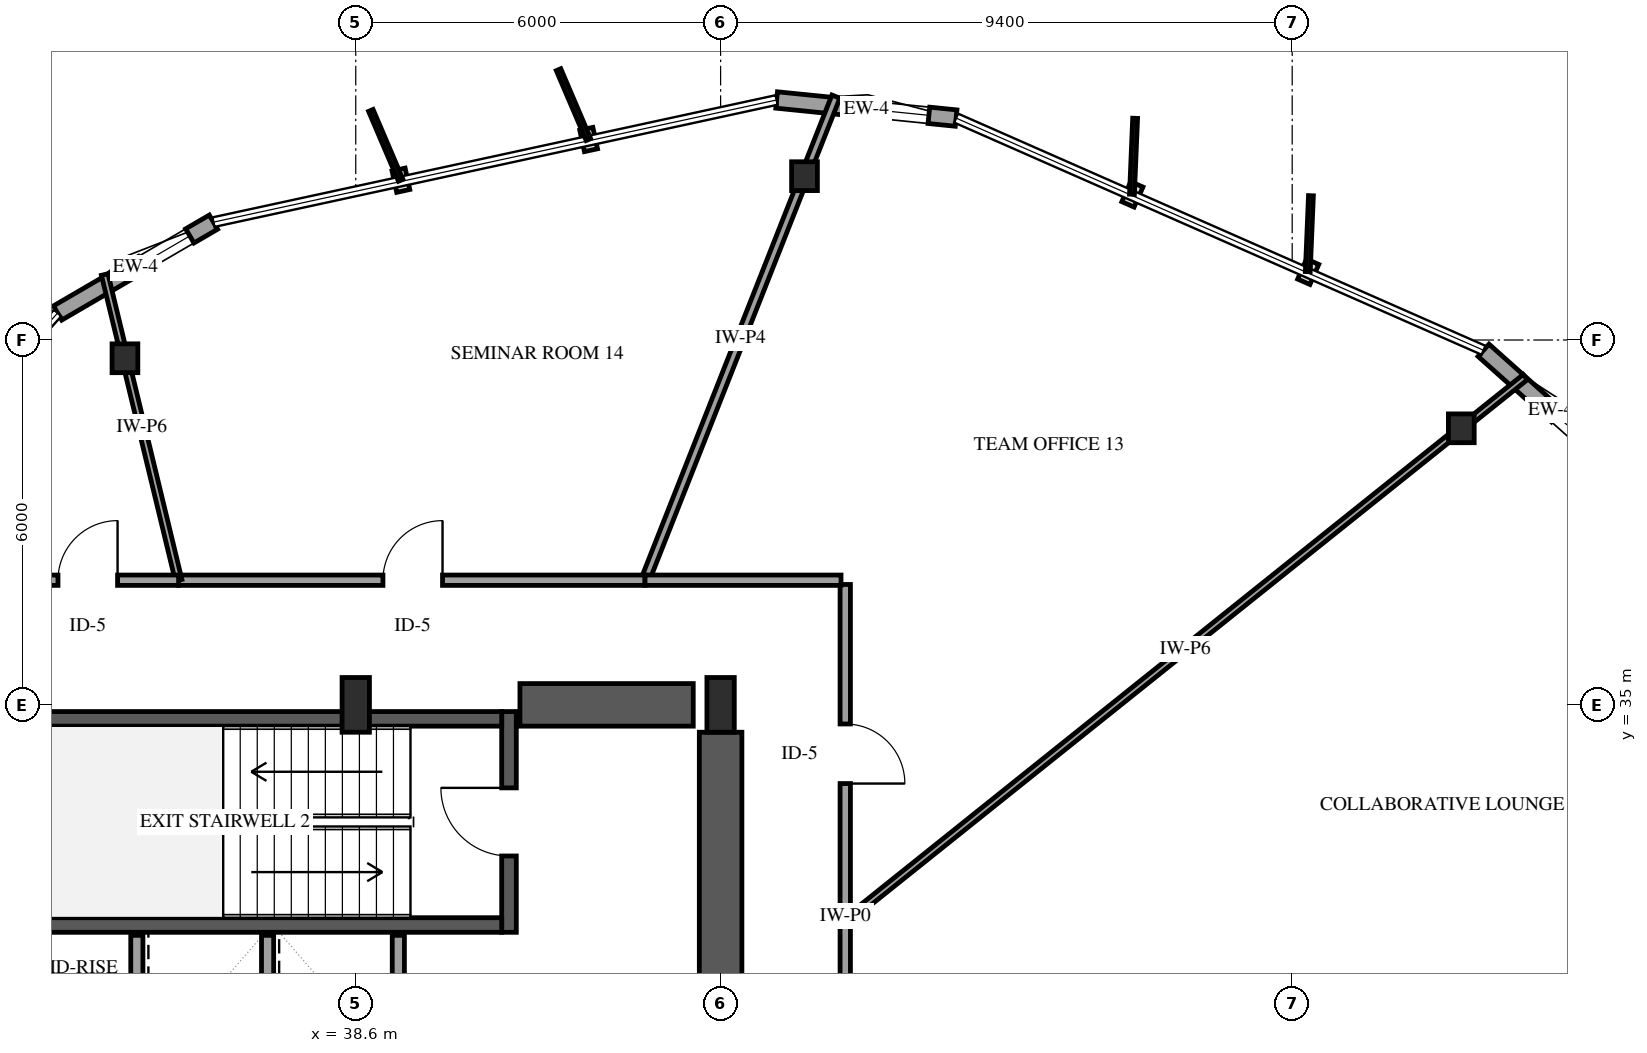
"""IFC4 building model, lengths in metres.
Left out: names, types, materials, properties, quantities, classifications, styles, units other than length and angle.
Written with IfcOpenShell. Run it as: python <this file> out.ifc"""

import sys

from ifc_helpers import new_model, si_unit, direction, frame, frame_2d, origin, origin_2d, place, context, subcontext, project, spatial, rectangle, i_section, extrude, element, fill, save


model = new_model("IFC4")
c1 = context("Model", 3, precision=1e-05, world=origin(), true_north=direction((0.0, 1.0)))
c2 = subcontext(c1, "Body", "Model", "MODEL_VIEW")
j1 = project(units=[si_unit("LENGTHUNIT", "METRE"), si_unit("PLANEANGLEUNIT", "RADIAN")], contexts=[c1])
p1 = place(None, origin())
s1 = spatial("IfcSite", under=j1, at=p1, CompositionType="ELEMENT")
p2 = place(p1, origin())
s2 = spatial("IfcBuilding", under=s1, at=p2, CompositionType="ELEMENT")
p3 = place(p2, frame((0.0, 0.0, 74.6)))
s3 = spatial("IfcBuildingStorey", under=s2, at=p3, CompositionType="ELEMENT", Elevation=74.6)
p4 = place(p3, frame((41.12, 31.26, 0.0), z_axis=(0.0, 0.0, 1.0), x_axis=(0.0, 1.0, 0.0)))
e1 = element("IfcWall", 1, at=p4, inside=s3, PredefinedType="SHEAR", context=c2, shape_type="SweptSolid", body=[
    extrude(rectangle(XDim=3.63, YDim=0.24, at=frame_2d((1.815, 0.0))), origin(), (0.0, 0.0, 1.0), 4.0),
])
p5 = place(p4, frame((1.255, 0.0, 0.0)))
e2 = element("IfcOpeningElement", 2, at=p5, cuts=e1, PredefinedType="OPENING", context=c2, shape_type="SweptSolid", body=[
    extrude(rectangle(XDim=1.12, YDim=2.15, at=frame_2d((0.56, 1.075))), frame((0.0, 0.13, 0.0), z_axis=(0.0, -1.0, 0.0), x_axis=(1.0, 0.0, 0.0)), (0.0, 0.0, 1.0), 0.26),
])
for number, where, z_axis, x_axis in (
    (3, (33.0, 31.38, 0.0), (0.0, 0.0, 1.0), (1.0, 0.0, 0.0)),
    (4, (33.0, 34.77, 0.0), (0.0, 0.0, 1.0), (1.0, 0.0, 0.0)),
):
    element("IfcWall", number, at=place(p3, frame(where, z_axis=z_axis, x_axis=x_axis)), inside=s3, PredefinedType="SHEAR", context=c2, shape_type="SweptSolid", body=[
        extrude(rectangle(XDim=8.0, YDim=0.24, at=frame_2d((4.0, 0.0))), origin(), (0.0, 0.0, 1.0), 4.0),
    ])
p6 = place(p3, frame((41.3, 35.0, 0.0), z_axis=(0.0, 0.0, 1.0), x_axis=(1.0, 0.0, 0.0)))
e5 = element("IfcWall", 5, at=p6, inside=s3, PredefinedType="SHEAR", context=c2, shape_type="SweptSolid", body=[
    extrude(rectangle(XDim=2.85, YDim=0.7, at=frame_2d((1.425, 0.0))), origin(), (0.0, 0.0, 1.0), 4.0),
])
p7 = place(p3, frame((44.6, 29.8, 0.0), z_axis=(0.0, 0.0, 1.0), x_axis=(0.0, 1.0, 0.0)))
e6 = element("IfcWall", 6, at=p7, inside=s3, PredefinedType="SHEAR", context=c2, shape_type="SweptSolid", body=[
    extrude(rectangle(XDim=4.75, YDim=0.7, at=frame_2d((2.375, 0.0))), origin(), (0.0, 0.0, 1.0), 4.0),
])
for number, where, z_axis, x_axis in (
    (7, (38.6, 35.0, 0.0), (0.0, 0.0, 1.0), (1.0, 0.0, 0.0)),
    (8, (44.6, 35.0, 0.0), (0.0, 0.0, 1.0), (1.0, 0.0, 0.0)),
):
    element("IfcColumn", number, at=place(p3, frame(where, z_axis=z_axis, x_axis=x_axis)), inside=s3, PredefinedType="PILASTER", context=c2, shape_type="SweptSolid", body=[
        extrude(rectangle(XDim=0.45, YDim=0.9, at=origin_2d()), origin(), (0.0, 0.0, 1.0), 4.0),
    ])
for number, where, z_axis, x_axis in (
    (9, (56.781, 39.548, 0.0), (0.0, 0.0, 1.0), (1.0, 0.0, 0.0)),
    (10, (45.98, 43.694, 0.0), (0.0, 0.0, 1.0), (1.0, 0.0, 0.0)),
    (11, (34.804, 40.7, 0.0), (0.0, 0.0, 1.0), (1.0, 0.0, 0.0)),
):
    element("IfcColumn", number, at=place(p3, frame(where, z_axis=z_axis, x_axis=x_axis)), inside=s3, PredefinedType="COLUMN", context=c2, shape_type="SweptSolid", body=[
        extrude(i_section(OverallWidth=0.424, OverallDepth=0.474, WebThickness=0.048, FlangeThickness=0.077, FilletRadius=0.038, at=origin_2d()), origin(), (0.0, 0.0, 1.0), 4.0),
    ])
p8 = place(p3, frame((59.36, 38.856, 0.0), z_axis=(0.0, 0.0, 1.0), x_axis=(-0.745968322864, 0.665981427131, 0.0)))
e12 = element("IfcWall", 12, at=p8, inside=s3, PredefinedType="SOLIDWALL", context=c2, shape_type="SweptSolid", body=[
    extrude(rectangle(XDim=2.967, YDim=0.27, at=frame_2d((1.483, 0.0))), origin(), (0.0, 0.0, 1.0), 3.079),
])
p9 = place(p8, frame((0.45, 0.0, 0.75)))
e13 = element("IfcOpeningElement", 13, at=p9, cuts=e12, PredefinedType="OPENING", context=c2, shape_type="SweptSolid", body=[
    extrude(rectangle(XDim=0.9, YDim=1.5, at=frame_2d((0.45, 0.75))), frame((0.0, 0.145, 0.0), z_axis=(0.0, -1.0, 0.0), x_axis=(1.0, 0.0, 0.0)), (0.0, 0.0, 1.0), 0.29),
])
p10 = place(p3, frame((48.473, 44.65, 0.0), z_axis=(0.0, 0.0, 1.0), x_axis=(-0.994955375676, 0.100318494868, 0.0)))
e14 = element("IfcWall", 14, at=p10, inside=s3, PredefinedType="SOLIDWALL", context=c2, shape_type="SweptSolid", body=[
    extrude(rectangle(XDim=2.967, YDim=0.27, at=frame_2d((1.483, 0.0))), origin(), (0.0, 0.0, 1.0), 3.079),
])
p11 = place(p10, frame((0.45, 0.0, 0.75)))
e15 = element("IfcOpeningElement", 15, at=p11, cuts=e14, PredefinedType="OPENING", context=c2, shape_type="SweptSolid", body=[
    extrude(rectangle(XDim=0.9, YDim=1.5, at=frame_2d((0.45, 0.75))), frame((0.0, 0.145, 0.0), z_axis=(0.0, -1.0, 0.0), x_axis=(1.0, 0.0, 0.0)), (0.0, 0.0, 1.0), 0.29),
])
p12 = place(p3, frame((36.26, 42.938, 0.0), z_axis=(0.0, 0.0, 1.0), x_axis=(-0.863895290782, -0.503671447041, 0.0)))
e16 = element("IfcWall", 16, at=p12, inside=s3, PredefinedType="SOLIDWALL", context=c2, shape_type="SweptSolid", body=[
    extrude(rectangle(XDim=2.967, YDim=0.27, at=frame_2d((1.483, 0.0))), origin(), (0.0, 0.0, 1.0), 3.079),
])
p13 = place(p12, frame((0.45, 0.0, 0.75)))
e17 = element("IfcOpeningElement", 17, at=p13, cuts=e16, PredefinedType="OPENING", context=c2, shape_type="SweptSolid", body=[
    extrude(rectangle(XDim=0.9, YDim=1.5, at=frame_2d((0.45, 0.75))), frame((0.0, 0.145, 0.0), z_axis=(0.0, -1.0, 0.0), x_axis=(1.0, 0.0, 0.0)), (0.0, 0.0, 1.0), 0.29),
])
for number, where, z_axis, x_axis in (
    (18, (35.0, 29.11, 0.0), (0.0, 0.0, 1.0), (0.0, 1.0, 0.0)),
    (19, (37.15, 29.11, 0.0), (0.0, 0.0, 1.0), (0.0, 1.0, 0.0)),
    (20, (39.3, 29.11, 0.0), (0.0, 0.0, 1.0), (0.0, 1.0, 0.0)),
):
    element("IfcWall", number, at=place(p3, frame(where, z_axis=z_axis, x_axis=x_axis)), inside=s3, PredefinedType="SOLIDWALL", context=c2, shape_type="SweptSolid", body=[
        extrude(rectangle(XDim=2.1, YDim=0.2, at=frame_2d((1.05, 0.0))), origin(), (0.0, 0.0, 1.0), 3.7),
    ])
p14 = place(p3, frame((46.65, 31.442, 0.0), z_axis=(0.0, 0.0, 1.0), x_axis=(0.780817252488, 0.624759488297, 0.0)))
e21 = element("IfcWall", 21, at=p14, inside=s3, PredefinedType="PARTITIONING", context=c2, shape_type="SweptSolid", body=[
    extrude(rectangle(XDim=14.322, YDim=0.11, at=frame_2d((7.161, 0.0))), origin(), (0.0, 0.0, 1.0), 3.7),
])
p15 = place(p3, frame((43.357, 37.05, 0.0), z_axis=(0.0, 0.0, 1.0), x_axis=(0.367152881948, 0.930160610474, 0.0)))
e22 = element("IfcWall", 22, at=p15, inside=s3, PredefinedType="PARTITIONING", context=c2, shape_type="SweptSolid", body=[
    extrude(rectangle(XDim=8.55, YDim=0.14, at=frame_2d((4.275, 0.0))), origin(), (0.0, 0.0, 1.0), 2.995),
])
p16 = place(p3, frame((35.687, 37.05, 0.0), z_axis=(0.0, 0.0, 1.0), x_axis=(1.0, 0.0, 0.0)))
e23 = element("IfcWall", 23, at=p16, inside=s3, PredefinedType="PARTITIONING", context=c2, shape_type="SweptSolid", body=[
    extrude(rectangle(XDim=7.67, YDim=0.17, at=frame_2d((3.835, 0.0))), origin(), (0.0, 0.0, 1.0), 3.7),
])
p17 = place(p16, frame((3.36, 0.0, 0.0)))
e24 = element("IfcOpeningElement", 24, at=p17, cuts=e23, PredefinedType="OPENING", context=c2, shape_type="SweptSolid", body=[
    extrude(rectangle(XDim=0.98, YDim=2.15, at=frame_2d((0.49, 1.075))), frame((0.0, 0.095, 0.0), z_axis=(0.0, -1.0, 0.0), x_axis=(1.0, 0.0, 0.0)), (0.0, 0.0, 1.0), 0.19),
])
p18 = place(p3, frame((46.65, 36.98, 0.0), z_axis=(0.0, 0.0, 1.0), x_axis=(0.0, -1.0, 0.0)))
e25 = element("IfcWall", 25, at=p18, inside=s3, PredefinedType="PARTITIONING", context=c2, shape_type="SweptSolid", body=[
    extrude(rectangle(XDim=5.538, YDim=0.17, at=frame_2d((2.769, 0.0))), origin(), (0.0, 0.0, 1.0), 3.7),
])
p19 = place(p18, frame((2.294, 0.0, 0.0)))
e26 = element("IfcOpeningElement", 26, at=p19, cuts=e25, PredefinedType="OPENING", context=c2, shape_type="SweptSolid", body=[
    extrude(rectangle(XDim=0.98, YDim=2.15, at=frame_2d((0.49, 1.075))), frame((0.0, 0.095, 0.0), z_axis=(0.0, -1.0, 0.0), x_axis=(1.0, 0.0, 0.0)), (0.0, 0.0, 1.0), 0.19),
])
p20 = place(p3, frame((35.687, 37.05, 0.0), z_axis=(0.0, 0.0, 1.0), x_axis=(-0.235131176425, 0.971963646374, 0.0)))
e27 = element("IfcWall", 27, at=p20, inside=s3, PredefinedType="PARTITIONING", context=c2, shape_type="SweptSolid", body=[
    extrude(rectangle(XDim=5.172, YDim=0.11, at=frame_2d((2.586, 0.0))), origin(), (0.0, 0.0, 1.0), 2.995),
])
p21 = place(p3, frame((46.65, 31.442, 0.0), z_axis=(0.0, 0.0, 1.0), x_axis=(0.0, -1.0, 0.0)))
e28 = element("IfcWall", 28, at=p21, inside=s3, PredefinedType="PARTITIONING", context=c2, shape_type="SweptSolid", body=[
    extrude(rectangle(XDim=4.849, YDim=0.17, at=frame_2d((2.424, 0.0))), origin(), (0.0, 0.0, 1.0), 3.7),
])
p22 = place(p21, frame((1.95, 0.0, 0.0)))
e29 = element("IfcOpeningElement", 29, at=p22, cuts=e28, PredefinedType="OPENING", context=c2, shape_type="SweptSolid", body=[
    extrude(rectangle(XDim=0.98, YDim=2.15, at=frame_2d((0.49, 1.075))), frame((0.0, 0.095, 0.0), z_axis=(0.0, -1.0, 0.0), x_axis=(1.0, 0.0, 0.0)), (0.0, 0.0, 1.0), 0.19),
])
p23 = place(p3, frame((43.357, 37.05, 0.0), z_axis=(0.0, 0.0, 1.0), x_axis=(1.0, 0.0, 0.0)))
e30 = element("IfcWall", 30, at=p23, inside=s3, PredefinedType="PARTITIONING", context=c2, shape_type="SweptSolid", body=[
    extrude(rectangle(XDim=3.223, YDim=0.17, at=frame_2d((1.612, 0.0))), origin(), (0.0, 0.0, 1.0), 3.7),
])
p24 = place(p3, frame((32.67, 37.05, 0.0), z_axis=(0.0, 0.0, 1.0), x_axis=(1.0, 0.0, 0.0)))
e31 = element("IfcWall", 31, at=p24, inside=s3, PredefinedType="PARTITIONING", context=c2, shape_type="SweptSolid", body=[
    extrude(rectangle(XDim=3.017, YDim=0.17, at=frame_2d((1.509, 0.0))), origin(), (0.0, 0.0, 1.0), 3.7),
])
p25 = place(p24, frame((1.033, 0.0, 0.0)))
e32 = element("IfcOpeningElement", 32, at=p25, cuts=e31, PredefinedType="OPENING", context=c2, shape_type="SweptSolid", body=[
    extrude(rectangle(XDim=0.98, YDim=2.15, at=frame_2d((0.49, 1.075))), frame((0.0, 0.095, 0.0), z_axis=(0.0, -1.0, 0.0), x_axis=(1.0, 0.0, 0.0)), (0.0, 0.0, 1.0), 0.19),
])
p26 = place(p9, origin())
e33 = element("IfcWindow", 33, at=p26, inside=s3, PartitioningType="SINGLE_PANEL", PredefinedType="WINDOW", context=c2, shape_type="SweptSolid", body=[
    extrude(rectangle(XDim=0.9, YDim=1.5, at=frame_2d((0.45, 0.75))), frame((0.0, 0.03, 0.0), z_axis=(0.0, -1.0, 0.0), x_axis=(1.0, 0.0, 0.0)), (0.0, 0.0, 1.0), 0.06),
])
fill(e13, e33)
p27 = place(p11, origin())
e34 = element("IfcWindow", 34, at=p27, inside=s3, PartitioningType="SINGLE_PANEL", PredefinedType="WINDOW", context=c2, shape_type="SweptSolid", body=[
    extrude(rectangle(XDim=0.9, YDim=1.5, at=frame_2d((0.45, 0.75))), frame((0.0, 0.03, 0.0), z_axis=(0.0, -1.0, 0.0), x_axis=(1.0, 0.0, 0.0)), (0.0, 0.0, 1.0), 0.06),
])
fill(e15, e34)
p28 = place(p13, origin())
e35 = element("IfcWindow", 35, at=p28, inside=s3, PartitioningType="SINGLE_PANEL", PredefinedType="WINDOW", context=c2, shape_type="SweptSolid", body=[
    extrude(rectangle(XDim=0.9, YDim=1.5, at=frame_2d((0.45, 0.75))), frame((0.0, 0.03, 0.0), z_axis=(0.0, -1.0, 0.0), x_axis=(1.0, 0.0, 0.0)), (0.0, 0.0, 1.0), 0.06),
])
fill(e17, e35)
p29 = place(p5, origin())
e36 = element("IfcDoor", 36, at=p29, inside=s3, OperationType="SINGLE_SWING_RIGHT", PredefinedType="DOOR", context=c2, shape_type="SweptSolid", body=[
    extrude(rectangle(XDim=1.12, YDim=2.15, at=frame_2d((0.56, 1.075))), frame((0.0, 0.025, 0.0), z_axis=(0.0, -1.0, 0.0), x_axis=(1.0, 0.0, 0.0)), (0.0, 0.0, 1.0), 0.05),
])
fill(e2, e36)
p30 = place(p17, origin())
e37 = element("IfcDoor", 37, at=p30, inside=s3, OperationType="SINGLE_SWING_RIGHT", PredefinedType="DOOR", context=c2, shape_type="SweptSolid", body=[
    extrude(rectangle(XDim=0.98, YDim=2.15, at=frame_2d((0.49, 1.075))), frame((0.0, 0.025, 0.0), z_axis=(0.0, -1.0, 0.0), x_axis=(1.0, 0.0, 0.0)), (0.0, 0.0, 1.0), 0.05),
])
fill(e24, e37)
p31 = place(p19, origin())
e38 = element("IfcDoor", 38, at=p31, inside=s3, OperationType="SINGLE_SWING_RIGHT", PredefinedType="DOOR", context=c2, shape_type="SweptSolid", body=[
    extrude(rectangle(XDim=0.98, YDim=2.15, at=frame_2d((0.49, 1.075))), frame((0.0, 0.025, 0.0), z_axis=(0.0, -1.0, 0.0), x_axis=(1.0, 0.0, 0.0)), (0.0, 0.0, 1.0), 0.05),
])
fill(e26, e38)
p32 = place(p25, origin())
e39 = element("IfcDoor", 39, at=p32, inside=s3, OperationType="SINGLE_SWING_RIGHT", PredefinedType="DOOR", context=c2, shape_type="SweptSolid", body=[
    extrude(rectangle(XDim=0.98, YDim=2.15, at=frame_2d((0.49, 1.075))), frame((0.0, 0.025, 0.0), z_axis=(0.0, -1.0, 0.0), x_axis=(1.0, 0.0, 0.0)), (0.0, 0.0, 1.0), 0.05),
])
fill(e32, e39)
save(model, sys.argv[1])
